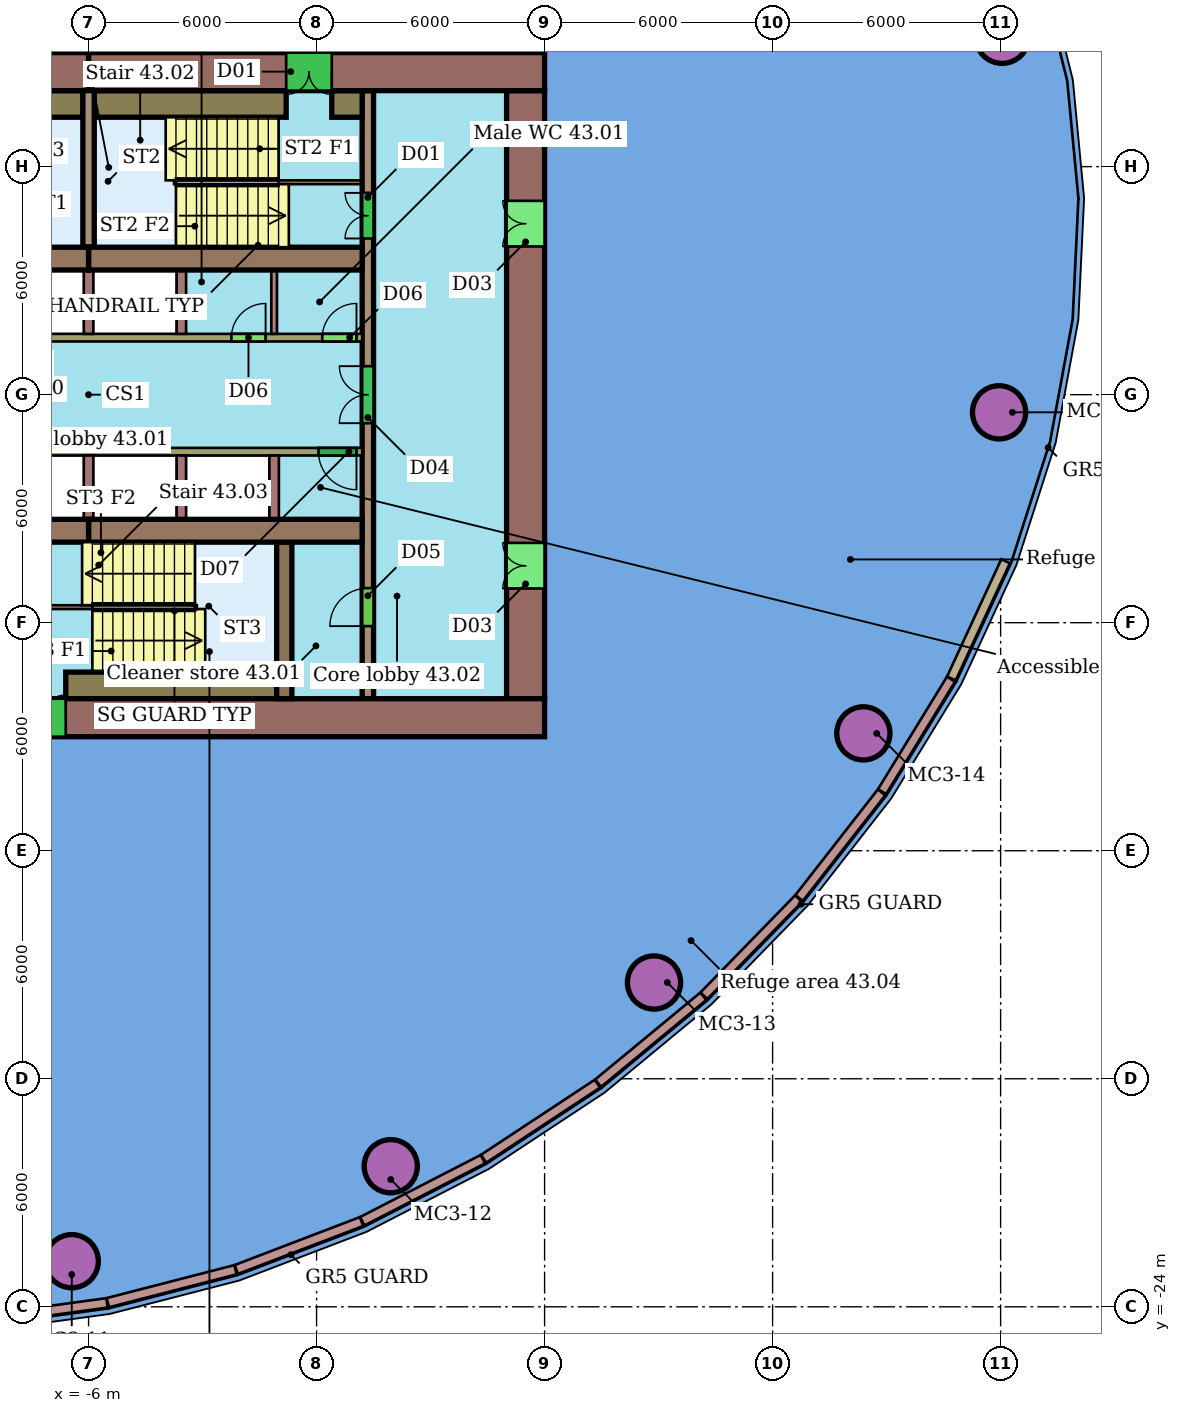
"""IFC4 building model, lengths in metres.
Left out: names, types, materials, properties, quantities, classifications, styles, units other than length and angle.
Written with IfcOpenShell. Run it as: python <this file> out.ifc"""

import sys

from ifc_helpers import new_model, si_unit, direction, frame, frame_2d, origin, origin_2d, place, context, subcontext, project, spatial, rectangle, hollow_circle, extrude, element, fill, save


model = new_model("IFC4")
c1 = context("Model", 3, precision=1e-05, world=origin(), true_north=direction((0.0, 1.0)))
c2 = subcontext(c1, "Body", "Model", "MODEL_VIEW")
j1 = project(units=[si_unit("LENGTHUNIT", "METRE"), si_unit("PLANEANGLEUNIT", "RADIAN")], contexts=[c1])
p1 = place(None, origin())
s1 = spatial("IfcSite", under=j1, at=p1, CompositionType="ELEMENT")
p2 = place(p1, origin())
s2 = spatial("IfcBuilding", under=s1, at=p2, CompositionType="ELEMENT")
p3 = place(p2, frame((0.0, 0.0, 179.4)))
s3 = spatial("IfcBuildingStorey", under=s2, at=p3, CompositionType="ELEMENT", Elevation=179.4)
for number, where, z_axis, x_axis in (
    (1, (-6.442, -22.8, 0.0), (0.0, 0.0, 1.0), (1.0, 0.0, 0.0)),
    (2, (1.952, -20.301, 0.0), (0.0, 0.0, 1.0), (1.0, 0.0, 0.0)),
    (3, (8.879, -15.467, 0.0), (0.0, 0.0, 1.0), (1.0, 0.0, 0.0)),
    (4, (14.388, -8.912, 0.0), (0.0, 0.0, 1.0), (1.0, 0.0, 0.0)),
    (5, (17.959, -0.464, 0.0), (0.0, 0.0, 1.0), (1.0, 0.0, 0.0)),
    (6, (18.041, 9.417, 0.0), (0.0, 0.0, 1.0), (1.0, 0.0, 0.0)),
):
    element("IfcColumn", number, at=place(p3, frame(where, z_axis=z_axis, x_axis=x_axis)), inside=s3, PredefinedType="COLUMN", context=c2, shape_type="SweptSolid", body=[
        extrude(hollow_circle(Radius=0.7, WallThickness=0.05, at=origin_2d()), origin(), (0.0, 0.0, 1.0), 3.45),
    ])
p4 = place(p3, frame((-8.881, -24.356, 0.0), z_axis=(0.0, 0.0, 1.0), x_axis=(0.990801720843, 0.135321653757, 0.0)))
e7 = element("IfcWall", 7, at=p4, inside=s3, PredefinedType="SOLIDWALL", context=c2, shape_type="SweptSolid", body=[
    extrude(rectangle(XDim=3.397, YDim=0.25, at=frame_2d((1.699, 0.0))), origin(), (0.0, 0.0, 1.0), 3.1),
])
p5 = place(p3, frame((-5.493, -23.892, 0.0), z_axis=(0.0, 0.0, 1.0), x_axis=(0.968247112596, 0.249995057849, 0.0)))
e8 = element("IfcWall", 8, at=p5, inside=s3, PredefinedType="SOLIDWALL", context=c2, shape_type="SweptSolid", body=[
    extrude(rectangle(XDim=3.47, YDim=0.25, at=frame_2d((1.735, 0.0))), origin(), (0.0, 0.0, 1.0), 3.1),
])
p6 = place(p3, frame((-2.112, -23.018, 0.0), z_axis=(0.0, 0.0, 1.0), x_axis=(0.933996829101, 0.357281294262, 0.0)))
e9 = element("IfcWall", 9, at=p6, inside=s3, PredefinedType="SOLIDWALL", context=c2, shape_type="SweptSolid", body=[
    extrude(rectangle(XDim=3.528, YDim=0.25, at=frame_2d((1.764, 0.0))), origin(), (0.0, 0.0, 1.0), 3.1),
])
p7 = place(p3, frame((1.203, -21.748, 0.0), z_axis=(0.0, 0.0, 1.0), x_axis=(0.889237716381, 0.457445388833, 0.0)))
e10 = element("IfcWall", 10, at=p7, inside=s3, PredefinedType="SOLIDWALL", context=c2, shape_type="SweptSolid", body=[
    extrude(rectangle(XDim=3.569, YDim=0.25, at=frame_2d((1.784, 0.0))), origin(), (0.0, 0.0, 1.0), 3.1),
])
p8 = place(p3, frame((4.395, -20.105, 0.0), z_axis=(0.0, 0.0, 1.0), x_axis=(0.834771348856, 0.55059676273, 0.0)))
e11 = element("IfcWall", 11, at=p8, inside=s3, PredefinedType="SOLIDWALL", context=c2, shape_type="SweptSolid", body=[
    extrude(rectangle(XDim=3.589, YDim=0.25, at=frame_2d((1.795, 0.0))), origin(), (0.0, 0.0, 1.0), 3.1),
])
p9 = place(p3, frame((7.409, -18.116, 0.0), z_axis=(0.0, 0.0, 1.0), x_axis=(0.771012569009, 0.63681992622, 0.0)))
e12 = element("IfcWall", 12, at=p9, inside=s3, PredefinedType="SOLIDWALL", context=c2, shape_type="SweptSolid", body=[
    extrude(rectangle(XDim=3.59, YDim=0.25, at=frame_2d((1.795, 0.0))), origin(), (0.0, 0.0, 1.0), 3.1),
])
p10 = place(p3, frame((10.192, -15.816, 0.0), z_axis=(0.0, 0.0, 1.0), x_axis=(0.697915115283, 0.716180488326, 0.0)))
e13 = element("IfcWall", 13, at=p10, inside=s3, PredefinedType="SOLIDWALL", context=c2, shape_type="SweptSolid", body=[
    extrude(rectangle(XDim=3.569, YDim=0.25, at=frame_2d((1.784, 0.0))), origin(), (0.0, 0.0, 1.0), 3.1),
])
p11 = place(p3, frame((12.697, -13.243, 0.0), z_axis=(0.0, 0.0, 1.0), x_axis=(0.615333786545, 0.788266662454, 0.0)))
e14 = element("IfcWall", 14, at=p11, inside=s3, PredefinedType="SOLIDWALL", context=c2, shape_type="SweptSolid", body=[
    extrude(rectangle(XDim=3.528, YDim=0.25, at=frame_2d((1.764, 0.0))), origin(), (0.0, 0.0, 1.0), 3.1),
])
p12 = place(p3, frame((14.88, -10.444, 0.0), z_axis=(0.0, 0.0, 1.0), x_axis=(0.522769927115, 0.852473813853, 0.0)))
e15 = element("IfcWall", 15, at=p12, inside=s3, PredefinedType="SOLIDWALL", context=c2, shape_type="SweptSolid", body=[
    extrude(rectangle(XDim=3.47, YDim=0.25, at=frame_2d((1.735, 0.0))), origin(), (0.0, 0.0, 1.0), 3.1),
])
p13 = place(p3, frame((16.705, -7.466, 0.0), z_axis=(0.0, 0.0, 1.0), x_axis=(0.419696101817, 0.90766468595, 0.0)))
e16 = element("IfcWall", 16, at=p13, inside=s3, PredefinedType="SOLIDWALL", context=c2, shape_type="SweptSolid", body=[
    extrude(rectangle(XDim=3.397, YDim=0.25, at=frame_2d((1.699, 0.0))), origin(), (0.0, 0.0, 1.0), 3.45),
])
p14 = place(p3, frame((6.0, 8.5, 0.0), z_axis=(0.0, 0.0, 1.0), x_axis=(-1.0, 0.0, 0.0)))
e17 = element("IfcWall", 17, at=p14, inside=s3, PredefinedType="SHEAR", context=c2, shape_type="SweptSolid", body=[
    extrude(rectangle(XDim=12.0, YDim=1.0, at=frame_2d((6.0, 0.0))), origin(), (0.0, 0.0, 1.0), 3.3),
])
p15 = place(p14, frame((5.6, 0.0, 0.0)))
e18 = element("IfcOpeningElement", 18, at=p15, cuts=e17, PredefinedType="OPENING", context=c2, shape_type="SweptSolid", body=[
    extrude(rectangle(XDim=1.2, YDim=2.1, at=frame_2d((0.6, 1.05))), frame((0.0, 0.51, 0.0), z_axis=(0.0, -1.0, 0.0), x_axis=(1.0, 0.0, 0.0)), (0.0, 0.0, 1.0), 1.02),
])
p16 = place(p3, frame((-6.0, 8.5, 0.0), z_axis=(0.0, 0.0, 1.0), x_axis=(-1.0, 0.0, 0.0)))
e19 = element("IfcWall", 19, at=p16, inside=s3, PredefinedType="SHEAR", context=c2, shape_type="SweptSolid", body=[
    extrude(rectangle(XDim=12.0, YDim=1.0, at=frame_2d((6.0, 0.0))), origin(), (0.0, 0.0, 1.0), 3.3),
])
p17 = place(p16, frame((5.2, 0.0, 0.0)))
e20 = element("IfcOpeningElement", 20, at=p17, cuts=e19, PredefinedType="OPENING", context=c2, shape_type="SweptSolid", body=[
    extrude(rectangle(XDim=1.2, YDim=2.1, at=frame_2d((0.6, 1.05))), frame((0.0, 0.51, 0.0), z_axis=(0.0, -1.0, 0.0), x_axis=(1.0, 0.0, 0.0)), (0.0, 0.0, 1.0), 1.02),
])
p18 = place(p3, frame((-18.0, -8.5, 0.0), z_axis=(0.0, 0.0, 1.0), x_axis=(1.0, 0.0, 0.0)))
e21 = element("IfcWall", 21, at=p18, inside=s3, PredefinedType="SHEAR", context=c2, shape_type="SweptSolid", body=[
    extrude(rectangle(XDim=24.0, YDim=1.0, at=frame_2d((12.0, 0.0))), origin(), (0.0, 0.0, 1.0), 3.3),
])
p19 = place(p18, frame((10.2, 0.0, 0.0)))
e22 = element("IfcOpeningElement", 22, at=p19, cuts=e21, PredefinedType="OPENING", context=c2, shape_type="SweptSolid", body=[
    extrude(rectangle(XDim=1.2, YDim=2.1, at=frame_2d((0.6, 1.05))), frame((0.0, 0.51, 0.0), z_axis=(0.0, -1.0, 0.0), x_axis=(1.0, 0.0, 0.0)), (0.0, 0.0, 1.0), 1.02),
])
p20 = place(p18, frame((6.0, 0.0, 0.0)))
e23 = element("IfcOpeningElement", 23, at=p20, cuts=e21, PredefinedType="OPENING", context=c2, shape_type="SweptSolid", body=[
    extrude(rectangle(XDim=1.2, YDim=2.1, at=frame_2d((0.6, 1.05))), frame((0.0, 0.51, 0.0), z_axis=(0.0, -1.0, 0.0), x_axis=(1.0, 0.0, 0.0)), (0.0, 0.0, 1.0), 1.02),
])
p21 = place(p3, frame((5.5, -8.0, 0.0), z_axis=(0.0, 0.0, 1.0), x_axis=(0.0, 1.0, 0.0)))
e24 = element("IfcWall", 24, at=p21, inside=s3, PredefinedType="SHEAR", context=c2, shape_type="SweptSolid", body=[
    extrude(rectangle(XDim=16.0, YDim=1.0, at=frame_2d((8.0, 0.0))), origin(), (0.0, 0.0, 1.0), 3.3),
])
p22 = place(p21, frame((2.9, 0.0, 0.0)))
e25 = element("IfcOpeningElement", 25, at=p22, cuts=e24, PredefinedType="OPENING", context=c2, shape_type="SweptSolid", body=[
    extrude(rectangle(XDim=1.2, YDim=2.1, at=frame_2d((0.6, 1.05))), frame((0.0, 0.51, 0.0), z_axis=(0.0, -1.0, 0.0), x_axis=(1.0, 0.0, 0.0)), (0.0, 0.0, 1.0), 1.02),
])
p23 = place(p21, frame((11.9, 0.0, 0.0)))
e26 = element("IfcOpeningElement", 26, at=p23, cuts=e24, PredefinedType="OPENING", context=c2, shape_type="SweptSolid", body=[
    extrude(rectangle(XDim=1.2, YDim=2.1, at=frame_2d((0.6, 1.05))), frame((0.0, 0.51, 0.0), z_axis=(0.0, -1.0, 0.0), x_axis=(1.0, 0.0, 0.0)), (0.0, 0.0, 1.0), 1.02),
])
for number, where, z_axis, x_axis in (
    (27, (-13.2, 3.58, 0.0), (0.0, 0.0, 1.0), (1.0, 0.0, 0.0)),
    (28, (-6.0, 3.58, 0.0), (0.0, 0.0, 1.0), (1.0, 0.0, 0.0)),
):
    element("IfcWall", number, at=place(p3, frame(where, z_axis=z_axis, x_axis=x_axis)), inside=s3, PredefinedType="SHEAR", context=c2, shape_type="SweptSolid", body=[
        extrude(rectangle(XDim=7.2, YDim=0.6, at=frame_2d((3.6, 0.0))), origin(), (0.0, 0.0, 1.0), 3.3),
    ])
p24 = place(p3, frame((-13.2, -3.58, 0.0), z_axis=(0.0, 0.0, 1.0), x_axis=(1.0, 0.0, 0.0)))
e29 = element("IfcWall", 29, at=p24, inside=s3, PredefinedType="SHEAR", context=c2, shape_type="SweptSolid", body=[
    extrude(rectangle(XDim=7.2, YDim=0.6, at=frame_2d((3.6, 0.0))), origin(), (0.0, 0.0, 1.0), 3.3),
])
p25 = place(p24, frame((0.496, 0.0, 0.0)))
e30 = element("IfcOpeningElement", 30, at=p25, cuts=e29, PredefinedType="OPENING", context=c2, shape_type="SweptSolid", body=[
    extrude(rectangle(XDim=1.2, YDim=2.1, at=frame_2d((0.6, 1.05))), frame((0.0, 0.31, 0.0), z_axis=(0.0, -1.0, 0.0), x_axis=(1.0, 0.0, 0.0)), (0.0, 0.0, 1.0), 0.62),
])
p26 = place(p24, frame((2.938, 0.0, 0.0)))
e31 = element("IfcOpeningElement", 31, at=p26, cuts=e29, PredefinedType="OPENING", context=c2, shape_type="SweptSolid", body=[
    extrude(rectangle(XDim=1.2, YDim=2.1, at=frame_2d((0.6, 1.05))), frame((0.0, 0.31, 0.0), z_axis=(0.0, -1.0, 0.0), x_axis=(1.0, 0.0, 0.0)), (0.0, 0.0, 1.0), 0.62),
])
p27 = place(p3, frame((-6.0, -3.58, 0.0), z_axis=(0.0, 0.0, 1.0), x_axis=(1.0, 0.0, 0.0)))
e32 = element("IfcWall", 32, at=p27, inside=s3, PredefinedType="SHEAR", context=c2, shape_type="SweptSolid", body=[
    extrude(rectangle(XDim=7.2, YDim=0.6, at=frame_2d((3.6, 0.0))), origin(), (0.0, 0.0, 1.0), 3.3),
])
p28 = place(p3, frame((1.35, -8.0, 0.0), z_axis=(0.0, 0.0, 1.0), x_axis=(0.0, 1.0, 0.0)))
e33 = element("IfcWall", 33, at=p28, inside=s3, PredefinedType="SHEAR", context=c2, shape_type="SweptSolid", body=[
    extrude(rectangle(XDim=16.0, YDim=0.3, at=frame_2d((8.0, 0.0))), origin(), (0.0, 0.0, 1.0), 3.3),
])
p29 = place(p28, frame((12.11, 0.0, 0.0)))
e34 = element("IfcOpeningElement", 34, at=p29, cuts=e33, PredefinedType="OPENING", context=c2, shape_type="SweptSolid", body=[
    extrude(rectangle(XDim=1.2, YDim=2.1, at=frame_2d((0.6, 1.05))), frame((0.0, 0.16, 0.0), z_axis=(0.0, -1.0, 0.0), x_axis=(1.0, 0.0, 0.0)), (0.0, 0.0, 1.0), 0.32),
])
p30 = place(p28, frame((1.91, 0.0, 0.0)))
e35 = element("IfcOpeningElement", 35, at=p30, cuts=e33, PredefinedType="OPENING", context=c2, shape_type="SweptSolid", body=[
    extrude(rectangle(XDim=1.0, YDim=2.1, at=frame_2d((0.5, 1.05))), frame((0.0, 0.16, 0.0), z_axis=(0.0, -1.0, 0.0), x_axis=(1.0, 0.0, 0.0)), (0.0, 0.0, 1.0), 0.32),
])
p31 = place(p28, frame((7.25, 0.0, 0.0)))
e36 = element("IfcOpeningElement", 36, at=p31, cuts=e33, PredefinedType="OPENING", context=c2, shape_type="SweptSolid", body=[
    extrude(rectangle(XDim=1.5, YDim=2.1, at=frame_2d((0.75, 1.05))), frame((0.0, 0.16, 0.0), z_axis=(0.0, -1.0, 0.0), x_axis=(1.0, 0.0, 0.0)), (0.0, 0.0, 1.0), 0.32),
])
p32 = place(p3, frame((-13.2, 1.5, 0.0), z_axis=(0.0, 0.0, 1.0), x_axis=(1.0, 0.0, 0.0)))
e37 = element("IfcWall", 37, at=p32, inside=s3, PredefinedType="SHEAR", context=c2, shape_type="SweptSolid", body=[
    extrude(rectangle(XDim=14.4, YDim=0.2, at=frame_2d((7.2, 0.0))), origin(), (0.0, 0.0, 1.0), 3.3),
])
p33 = place(p32, frame((10.958, 0.0, 0.0)))
e38 = element("IfcOpeningElement", 38, at=p33, cuts=e37, PredefinedType="OPENING", context=c2, shape_type="SweptSolid", body=[
    extrude(rectangle(XDim=0.9, YDim=2.1, at=frame_2d((0.45, 1.05))), frame((0.0, 0.11, 0.0), z_axis=(0.0, -1.0, 0.0), x_axis=(1.0, 0.0, 0.0)), (0.0, 0.0, 1.0), 0.22),
])
p34 = place(p32, frame((13.35, 0.0, 0.0)))
e39 = element("IfcOpeningElement", 39, at=p34, cuts=e37, PredefinedType="OPENING", context=c2, shape_type="SweptSolid", body=[
    extrude(rectangle(XDim=0.9, YDim=2.1, at=frame_2d((0.45, 1.05))), frame((0.0, 0.11, 0.0), z_axis=(0.0, -1.0, 0.0), x_axis=(1.0, 0.0, 0.0)), (0.0, 0.0, 1.0), 0.22),
])
p35 = place(p3, frame((1.2, -1.5, 0.0), z_axis=(0.0, 0.0, 1.0), x_axis=(-1.0, 0.0, 0.0)))
e40 = element("IfcWall", 40, at=p35, inside=s3, PredefinedType="SHEAR", context=c2, shape_type="SweptSolid", body=[
    extrude(rectangle(XDim=14.4, YDim=0.2, at=frame_2d((7.2, 0.0))), origin(), (0.0, 0.0, 1.0), 3.3),
])
p36 = place(p35, frame((0.15, 0.0, 0.0)))
e41 = element("IfcOpeningElement", 41, at=p36, cuts=e40, PredefinedType="OPENING", context=c2, shape_type="SweptSolid", body=[
    extrude(rectangle(XDim=1.0, YDim=2.1, at=frame_2d((0.5, 1.05))), frame((0.0, 0.11, 0.0), z_axis=(0.0, -1.0, 0.0), x_axis=(1.0, 0.0, 0.0)), (0.0, 0.0, 1.0), 0.22),
])
p37 = place(p3, frame((-0.85, -3.88, 0.0), z_axis=(0.0, 0.0, 1.0), x_axis=(0.0, -1.0, 0.0)))
e42 = element("IfcWall", 42, at=p37, inside=s3, PredefinedType="SHEAR", context=c2, shape_type="SweptSolid", body=[
    extrude(rectangle(XDim=4.12, YDim=0.4, at=frame_2d((2.06, 0.0))), origin(), (0.0, 0.0, 1.0), 3.3),
])
p38 = place(p3, frame((-6.0, 3.88, 0.0), z_axis=(0.0, 0.0, 1.0), x_axis=(0.0, 1.0, 0.0)))
e43 = element("IfcWall", 43, at=p38, inside=s3, PredefinedType="SHEAR", context=c2, shape_type="SweptSolid", body=[
    extrude(rectangle(XDim=4.12, YDim=0.3, at=frame_2d((2.06, 0.0))), origin(), (0.0, 0.0, 1.0), 3.3),
])
for number, where, z_axis, x_axis in (
    (44, (-11.2, 7.65, 0.0), (0.0, 0.0, 1.0), (1.0, 0.0, 0.0)),
    (45, (-5.85, 7.65, 0.0), (0.0, 0.0, 1.0), (1.0, 0.0, 0.0)),
):
    element("IfcWall", number, at=place(p3, frame(where, z_axis=z_axis, x_axis=x_axis)), inside=s3, PredefinedType="SHEAR", context=c2, shape_type="SweptSolid", body=[
        extrude(rectangle(XDim=5.05, YDim=0.7, at=frame_2d((2.525, 0.0))), origin(), (0.0, 0.0, 1.0), 3.3),
    ])
p39 = place(p3, frame((0.4, 7.65, 0.0), z_axis=(0.0, 0.0, 1.0), x_axis=(1.0, 0.0, 0.0)))
e46 = element("IfcWall", 46, at=p39, inside=s3, PredefinedType="SHEAR", context=c2, shape_type="SweptSolid", body=[
    extrude(rectangle(XDim=0.8, YDim=0.7, at=frame_2d((0.4, 0.0))), origin(), (0.0, 0.0, 1.0), 3.3),
])
p40 = place(p3, frame((-6.6, -7.65, 0.0), z_axis=(0.0, 0.0, 1.0), x_axis=(1.0, 0.0, 0.0)))
e47 = element("IfcWall", 47, at=p40, inside=s3, PredefinedType="SHEAR", context=c2, shape_type="SweptSolid", body=[
    extrude(rectangle(XDim=5.55, YDim=0.7, at=frame_2d((2.775, 0.0))), origin(), (0.0, 0.0, 1.0), 3.3),
])
p41 = place(p3, frame((1.2, 5.59, 0.0), z_axis=(0.0, 0.0, 1.0), x_axis=(-1.0, 0.0, 0.0)))
e48 = element("IfcWall", 48, at=p41, inside=s3, PredefinedType="SHEAR", context=c2, shape_type="SweptSolid", body=[
    extrude(rectangle(XDim=2.2, YDim=0.1, at=frame_2d((1.1, 0.0))), origin(), (0.0, 0.0, 1.0), 3.3),
])
p42 = place(p3, frame((-8.1, -5.59, 0.0), z_axis=(0.0, 0.0, 1.0), x_axis=(1.0, 0.0, 0.0)))
e49 = element("IfcWall", 49, at=p42, inside=s3, PredefinedType="SHEAR", context=c2, shape_type="SweptSolid", body=[
    extrude(rectangle(XDim=2.2, YDim=0.1, at=frame_2d((1.1, 0.0))), origin(), (0.0, 0.0, 1.0), 3.3),
])
for number, where, z_axis, x_axis in (
    (50, (-6.0, 1.6, 0.0), (0.0, 0.0, 1.0), (0.0, 1.0, 0.0)),
    (51, (-3.558, 1.6, 0.0), (0.0, 0.0, 1.0), (0.0, 1.0, 0.0)),
):
    element("IfcWall", number, at=place(p3, frame(where, z_axis=z_axis, x_axis=x_axis)), inside=s3, PredefinedType="SHEAR", context=c2, shape_type="SweptSolid", body=[
        extrude(rectangle(XDim=1.68, YDim=0.25, at=frame_2d((0.84, 0.0))), origin(), (0.0, 0.0, 1.0), 3.3),
    ])
p43 = place(p3, frame((-1.117, 1.6, 0.0), z_axis=(0.0, 0.0, 1.0), x_axis=(0.0, 1.0, 0.0)))
e52 = element("IfcWall", 52, at=p43, inside=s3, PredefinedType="PARTITIONING", context=c2, shape_type="SweptSolid", body=[
    extrude(rectangle(XDim=1.68, YDim=0.15, at=frame_2d((0.84, 0.0))), origin(), (0.0, 0.0, 1.0), 3.3),
])
for number, where, z_axis, x_axis in (
    (53, (-6.0, -1.6, 0.0), (0.0, 0.0, 1.0), (0.0, -1.0, 0.0)),
    (54, (-3.558, -1.6, 0.0), (0.0, 0.0, 1.0), (0.0, -1.0, 0.0)),
    (55, (-1.117, -1.6, 0.0), (0.0, 0.0, 1.0), (0.0, -1.0, 0.0)),
):
    element("IfcWall", number, at=place(p3, frame(where, z_axis=z_axis, x_axis=x_axis)), inside=s3, PredefinedType="SHEAR", context=c2, shape_type="SweptSolid", body=[
        extrude(rectangle(XDim=1.68, YDim=0.25, at=frame_2d((0.84, 0.0))), origin(), (0.0, 0.0, 1.0), 3.3),
    ])
p44 = place(p15, origin())
e56 = element("IfcDoor", 56, at=p44, inside=s3, OperationType="DOUBLE_DOOR_SINGLE_SWING", PredefinedType="NOTDEFINED", context=c2, shape_type="SweptSolid", body=[
    extrude(rectangle(XDim=1.2, YDim=2.1, at=frame_2d((0.6, 1.05))), frame((0.0, 0.025, 0.0), z_axis=(0.0, -1.0, 0.0), x_axis=(1.0, 0.0, 0.0)), (0.0, 0.0, 1.0), 0.05),
])
fill(e18, e56)
p45 = place(p19, origin())
e57 = element("IfcDoor", 57, at=p45, inside=s3, OperationType="DOUBLE_DOOR_SINGLE_SWING", PredefinedType="NOTDEFINED", context=c2, shape_type="SweptSolid", body=[
    extrude(rectangle(XDim=1.2, YDim=2.1, at=frame_2d((0.6, 1.05))), frame((0.0, 0.025, 0.0), z_axis=(0.0, -1.0, 0.0), x_axis=(1.0, 0.0, 0.0)), (0.0, 0.0, 1.0), 0.05),
])
fill(e22, e57)
p46 = place(p22, origin())
e58 = element("IfcDoor", 58, at=p46, inside=s3, OperationType="DOUBLE_DOOR_SINGLE_SWING", PredefinedType="NOTDEFINED", context=c2, shape_type="SweptSolid", body=[
    extrude(rectangle(XDim=1.2, YDim=2.1, at=frame_2d((0.6, 1.05))), frame((0.0, 0.025, 0.0), z_axis=(0.0, -1.0, 0.0), x_axis=(1.0, 0.0, 0.0)), (0.0, 0.0, 1.0), 0.05),
])
fill(e25, e58)
p47 = place(p23, origin())
e59 = element("IfcDoor", 59, at=p47, inside=s3, OperationType="DOUBLE_DOOR_SINGLE_SWING", PredefinedType="NOTDEFINED", context=c2, shape_type="SweptSolid", body=[
    extrude(rectangle(XDim=1.2, YDim=2.1, at=frame_2d((0.6, 1.05))), frame((0.0, 0.025, 0.0), z_axis=(0.0, -1.0, 0.0), x_axis=(1.0, 0.0, 0.0)), (0.0, 0.0, 1.0), 0.05),
])
fill(e26, e59)
p48 = place(p29, origin())
e60 = element("IfcDoor", 60, at=p48, inside=s3, OperationType="DOUBLE_DOOR_SINGLE_SWING", PredefinedType="NOTDEFINED", context=c2, shape_type="SweptSolid", body=[
    extrude(rectangle(XDim=1.2, YDim=2.1, at=frame_2d((0.6, 1.05))), frame((0.0, 0.025, 0.0), z_axis=(0.0, -1.0, 0.0), x_axis=(1.0, 0.0, 0.0)), (0.0, 0.0, 1.0), 0.05),
])
fill(e34, e60)
p49 = place(p30, origin())
e61 = element("IfcDoor", 61, at=p49, inside=s3, OperationType="SINGLE_SWING_LEFT", PredefinedType="NOTDEFINED", context=c2, shape_type="SweptSolid", body=[
    extrude(rectangle(XDim=1.0, YDim=2.1, at=frame_2d((0.5, 1.05))), frame((0.0, 0.025, 0.0), z_axis=(0.0, -1.0, 0.0), x_axis=(1.0, 0.0, 0.0)), (0.0, 0.0, 1.0), 0.05),
])
fill(e35, e61)
p50 = place(p31, origin())
e62 = element("IfcDoor", 62, at=p50, inside=s3, OperationType="DOUBLE_DOOR_SINGLE_SWING", PredefinedType="NOTDEFINED", context=c2, shape_type="SweptSolid", body=[
    extrude(rectangle(XDim=1.5, YDim=2.1, at=frame_2d((0.75, 1.05))), frame((0.0, 0.025, 0.0), z_axis=(0.0, -1.0, 0.0), x_axis=(1.0, 0.0, 0.0)), (0.0, 0.0, 1.0), 0.05),
])
fill(e36, e62)
p51 = place(p33, origin())
e63 = element("IfcDoor", 63, at=p51, inside=s3, OperationType="SINGLE_SWING_RIGHT", PredefinedType="NOTDEFINED", context=c2, shape_type="SweptSolid", body=[
    extrude(rectangle(XDim=0.9, YDim=2.1, at=frame_2d((0.45, 1.05))), frame((0.0, 0.025, 0.0), z_axis=(0.0, -1.0, 0.0), x_axis=(1.0, 0.0, 0.0)), (0.0, 0.0, 1.0), 0.05),
])
fill(e38, e63)
p52 = place(p34, origin())
e64 = element("IfcDoor", 64, at=p52, inside=s3, OperationType="SINGLE_SWING_RIGHT", PredefinedType="NOTDEFINED", context=c2, shape_type="SweptSolid", body=[
    extrude(rectangle(XDim=0.9, YDim=2.1, at=frame_2d((0.45, 1.05))), frame((0.0, 0.025, 0.0), z_axis=(0.0, -1.0, 0.0), x_axis=(1.0, 0.0, 0.0)), (0.0, 0.0, 1.0), 0.05),
])
fill(e39, e64)
p53 = place(p36, origin())
e65 = element("IfcDoor", 65, at=p53, inside=s3, OperationType="SINGLE_SWING_LEFT", PredefinedType="NOTDEFINED", context=c2, shape_type="SweptSolid", body=[
    extrude(rectangle(XDim=1.0, YDim=2.1, at=frame_2d((0.5, 1.05))), frame((0.0, 0.025, 0.0), z_axis=(0.0, -1.0, 0.0), x_axis=(1.0, 0.0, 0.0)), (0.0, 0.0, 1.0), 0.05),
])
fill(e41, e65)
save(model, sys.argv[1])
